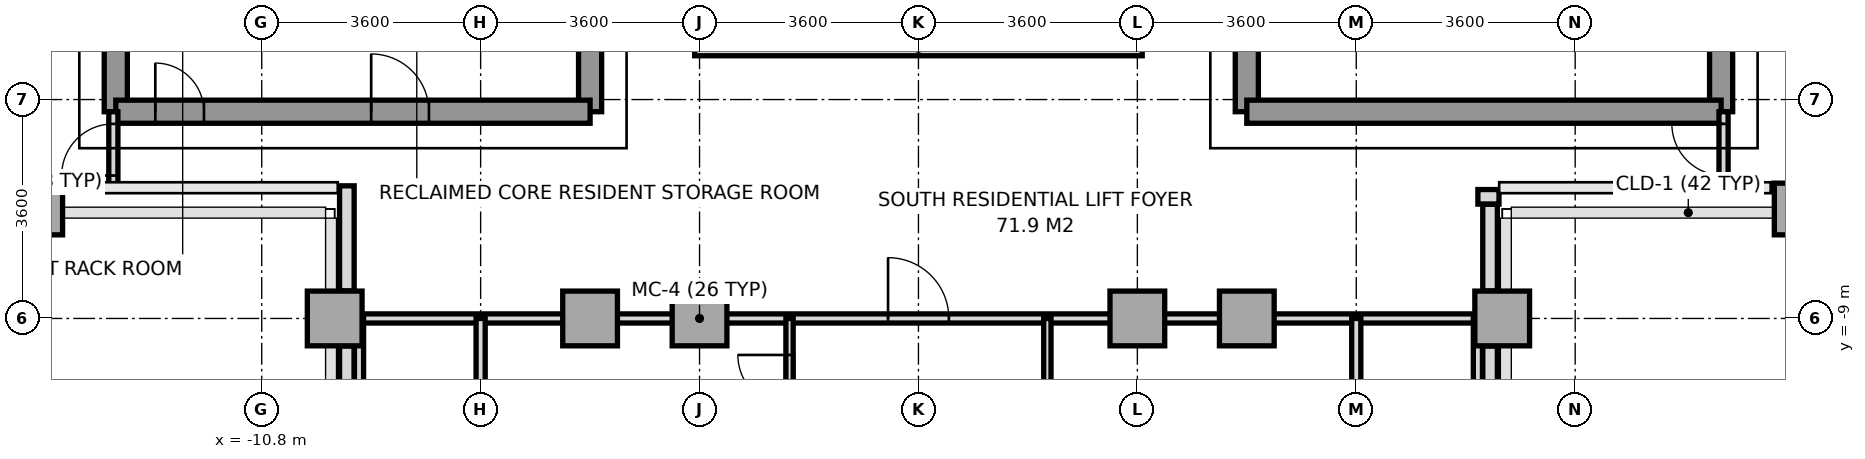
"""IFC4 building model, lengths in metres.
Left out: names, types, materials, properties, quantities, classifications, styles, units other than length and angle.
Written with IfcOpenShell. Run it as: python <this file> out.ifc"""

import sys

from ifc_helpers import new_model, si_unit, direction, frame, frame_2d, origin, origin_2d, place, context, subcontext, project, spatial, rectangle, extrude, source, transform, mapped, element, fill, save


model = new_model("IFC4")
c1 = context("Model", 3, precision=1e-05, world=origin(), true_north=direction((0.0, 1.0)))
c2 = subcontext(c1, "Body", "Model", "MODEL_VIEW")
j1 = project(units=[si_unit("LENGTHUNIT", "METRE"), si_unit("PLANEANGLEUNIT", "RADIAN")], contexts=[c1])
p1 = place(None, origin())
s1 = spatial("IfcSite", under=j1, at=p1, CompositionType="ELEMENT")
p2 = place(p1, origin())
s2 = spatial("IfcBuilding", under=s1, at=p2, CompositionType="ELEMENT")
p3 = place(p2, frame((0.0, 0.0, 208.0)))
s3 = spatial("IfcBuildingStorey", under=s2, at=p3, CompositionType="ELEMENT", Elevation=208.0)
m1 = source(origin(), c2, "Body", "SweptSolid", [
    extrude(rectangle(XDim=0.65, YDim=0.85, at=origin_2d()), origin(), (0.0, 0.0, 1.0), 3.2),
])
p4 = place(p3, frame((-14.4, -7.2, 0.0), z_axis=(0.0, 0.0, 1.0), x_axis=(1.0, 0.0, 0.0)))
e1 = element("IfcColumn", 1, at=p4, inside=s3, PredefinedType="COLUMN", context=c2, shape_type="MappedRepresentation", body=[
    mapped(m1, transform((0.0, 0.0, 0.0), x_axis=(1.0, 0.0, 0.0), y_axis=(0.0, 1.0, 0.0), z_axis=(0.0, 0.0, 1.0), scale=1.0)),
])
m2 = source(origin(), c2, "Body", "SweptSolid", [
    extrude(rectangle(XDim=0.9, YDim=0.9, at=origin_2d()), origin(), (0.0, 0.0, 1.0), 3.2),
])
for number, where, z_axis, x_axis in (
    (2, (-9.6, -9.0, 0.0), (0.0, 0.0, 1.0), (1.0, 0.0, 0.0)),
    (3, (-5.4, -9.0, 0.0), (0.0, 0.0, 1.0), (1.0, 0.0, 0.0)),
    (4, (-3.6, -9.0, 0.0), (0.0, 0.0, 1.0), (1.0, 0.0, 0.0)),
    (5, (3.6, -9.0, 0.0), (0.0, 0.0, 1.0), (1.0, 0.0, 0.0)),
    (6, (5.4, -9.0, 0.0), (0.0, 0.0, 1.0), (1.0, 0.0, 0.0)),
    (7, (9.6, -9.0, 0.0), (0.0, 0.0, 1.0), (1.0, 0.0, 0.0)),
):
    element("IfcColumn", number, at=place(p3, frame(where, z_axis=z_axis, x_axis=x_axis)), inside=s3, PredefinedType="COLUMN", context=c2, shape_type="MappedRepresentation", body=[
        mapped(m2, transform((0.0, 0.0, 0.0), x_axis=(1.0, 0.0, 0.0), y_axis=(0.0, 1.0, 0.0), z_axis=(0.0, 0.0, 1.0), scale=1.0)),
    ])
p5 = place(p3, frame((14.4, -7.2, 0.0), z_axis=(0.0, 0.0, 1.0), x_axis=(1.0, 0.0, 0.0)))
e8 = element("IfcColumn", 8, at=p5, inside=s3, PredefinedType="COLUMN", context=c2, shape_type="MappedRepresentation", body=[
    mapped(m1, transform((0.0, 0.0, 0.0), x_axis=(1.0, 0.0, 0.0), y_axis=(0.0, 1.0, 0.0), z_axis=(0.0, 0.0, 1.0), scale=1.0)),
])
p6 = place(p3, frame((9.547, -7.0, 0.0), z_axis=(0.0, 0.0, 1.0), x_axis=(-1.0, 0.0, 0.0)))
e9 = element("IfcWall", 9, at=p6, inside=s3, PredefinedType="PARAPET", context=c2, shape_type="SweptSolid", body=[
    extrude(rectangle(XDim=0.347, YDim=0.24, at=frame_2d((0.174, 0.0))), origin(), (0.0, 0.0, 1.0), 1.15),
])
p7 = place(p3, frame((9.4, -7.123, 0.0), z_axis=(0.0, 0.0, 1.0), x_axis=(0.0, -1.0, 0.0)))
e10 = element("IfcWall", 10, at=p7, inside=s3, PredefinedType="PARAPET", context=c2, shape_type="SweptSolid", body=[
    extrude(rectangle(XDim=1.424, YDim=0.24, at=frame_2d((0.712, 0.0))), origin(), (0.0, 0.0, 1.0), 1.15),
])
p8 = place(p3, frame((9.4, -9.453, 0.0), z_axis=(0.0, 0.0, 1.0), x_axis=(0.0, -1.0, 0.0)))
e11 = element("IfcWall", 11, at=p8, inside=s3, PredefinedType="PARAPET", context=c2, shape_type="SweptSolid", body=[
    extrude(rectangle(XDim=6.15, YDim=0.24, at=frame_2d((3.075, 0.0))), origin(), (0.0, 0.0, 1.0), 1.15),
])
p9 = place(p3, frame((-9.4, -15.358, 0.0), z_axis=(0.0, 0.0, 1.0), x_axis=(0.0, 1.0, 0.0)))
e12 = element("IfcWall", 12, at=p9, inside=s3, PredefinedType="PARAPET", context=c2, shape_type="SweptSolid", body=[
    extrude(rectangle(XDim=5.905, YDim=0.24, at=frame_2d((2.952, 0.0))), origin(), (0.0, 0.0, 1.0), 1.15),
])
p10 = place(p3, frame((-9.4, -8.547, 0.0), z_axis=(0.0, 0.0, 1.0), x_axis=(0.0, 1.0, 0.0)))
e13 = element("IfcWall", 13, at=p10, inside=s3, PredefinedType="PARAPET", context=c2, shape_type="SweptSolid", body=[
    extrude(rectangle(XDim=1.728, YDim=0.24, at=frame_2d((0.864, 0.0))), origin(), (0.0, 0.0, 1.0), 1.15),
])
p11 = place(p3, frame((-13.2, -5.6, 0.0), z_axis=(0.0, 0.0, 1.0), x_axis=(0.0, 1.0, 0.0)))
e14 = element("IfcWall", 14, at=p11, inside=s3, PredefinedType="SHEAR", context=c2, shape_type="SweptSolid", body=[
    extrude(rectangle(XDim=11.2, YDim=0.38, at=frame_2d((5.6, 0.0))), origin(), (0.0, 0.0, 1.0), 3.2),
])
p12 = place(p3, frame((-5.4, -5.6, 0.0), z_axis=(0.0, 0.0, 1.0), x_axis=(0.0, 1.0, 0.0)))
e15 = element("IfcWall", 15, at=p12, inside=s3, PredefinedType="SHEAR", context=c2, shape_type="SweptSolid", body=[
    extrude(rectangle(XDim=12.5, YDim=0.38, at=frame_2d((6.25, 0.0))), origin(), (0.0, 0.0, 1.0), 3.2),
])
p13 = place(p12, frame((4.55, 0.0, 0.0)))
e16 = element("IfcOpeningElement", 16, at=p13, cuts=e15, PredefinedType="OPENING", context=c2, shape_type="SweptSolid", body=[
    extrude(rectangle(XDim=1.2, YDim=2.2, at=frame_2d((0.6, 1.1))), frame((0.0, 0.2, 0.0), z_axis=(0.0, -1.0, 0.0), x_axis=(1.0, 0.0, 0.0)), (0.0, 0.0, 1.0), 0.4),
])
p14 = place(p12, frame((10.45, 0.0, 0.0)))
e17 = element("IfcOpeningElement", 17, at=p14, cuts=e15, PredefinedType="OPENING", context=c2, shape_type="SweptSolid", body=[
    extrude(rectangle(XDim=1.2, YDim=2.2, at=frame_2d((0.6, 1.1))), frame((0.0, 0.2, 0.0), z_axis=(0.0, -1.0, 0.0), x_axis=(1.0, 0.0, 0.0)), (0.0, 0.0, 1.0), 0.4),
])
p15 = place(p12, frame((6.86, 0.0, 0.0)))
e18 = element("IfcOpeningElement", 18, at=p15, cuts=e15, PredefinedType="OPENING", context=c2, shape_type="SweptSolid", body=[
    extrude(rectangle(XDim=0.8, YDim=2.1, at=frame_2d((0.4, 1.05))), frame((0.0, 0.2, 0.0), z_axis=(0.0, -1.0, 0.0), x_axis=(1.0, 0.0, 0.0)), (0.0, 0.0, 1.0), 0.4),
])
p16 = place(p3, frame((-13.2, -5.6, 0.0), z_axis=(0.0, 0.0, 1.0), x_axis=(1.0, 0.0, 0.0)))
e19 = element("IfcWall", 19, at=p16, inside=s3, PredefinedType="SHEAR", context=c2, shape_type="SweptSolid", body=[
    extrude(rectangle(XDim=7.8, YDim=0.38, at=frame_2d((3.9, 0.0))), origin(), (0.0, 0.0, 1.0), 3.2),
])
p17 = place(p16, frame((0.65, 0.0, 0.0)))
e20 = element("IfcOpeningElement", 20, at=p17, cuts=e19, PredefinedType="OPENING", context=c2, shape_type="SweptSolid", body=[
    extrude(rectangle(XDim=0.8, YDim=2.1, at=frame_2d((0.4, 1.05))), frame((0.0, 0.2, 0.0), z_axis=(0.0, -1.0, 0.0), x_axis=(1.0, 0.0, 0.0)), (0.0, 0.0, 1.0), 0.4),
])
p18 = place(p16, frame((4.2, 0.0, 0.0)))
e21 = element("IfcOpeningElement", 21, at=p18, cuts=e19, PredefinedType="OPENING", context=c2, shape_type="SweptSolid", body=[
    extrude(rectangle(XDim=0.95, YDim=2.15, at=frame_2d((0.475, 1.075))), frame((0.0, 0.2, 0.0), z_axis=(0.0, -1.0, 0.0), x_axis=(1.0, 0.0, 0.0)), (0.0, 0.0, 1.0), 0.4),
])
p19 = place(p3, frame((13.2, -5.6, 0.0), z_axis=(0.0, 0.0, 1.0), x_axis=(0.0, 1.0, 0.0)))
e22 = element("IfcWall", 22, at=p19, inside=s3, PredefinedType="SHEAR", context=c2, shape_type="SweptSolid", body=[
    extrude(rectangle(XDim=11.2, YDim=0.38, at=frame_2d((5.6, 0.0))), origin(), (0.0, 0.0, 1.0), 3.2),
])
p20 = place(p3, frame((5.4, -5.6, 0.0), z_axis=(0.0, 0.0, 1.0), x_axis=(0.0, 1.0, 0.0)))
e23 = element("IfcWall", 23, at=p20, inside=s3, PredefinedType="SHEAR", context=c2, shape_type="SweptSolid", body=[
    extrude(rectangle(XDim=12.5, YDim=0.38, at=frame_2d((6.25, 0.0))), origin(), (0.0, 0.0, 1.0), 3.2),
])
p21 = place(p20, frame((4.55, 0.0, 0.0)))
e24 = element("IfcOpeningElement", 24, at=p21, cuts=e23, PredefinedType="OPENING", context=c2, shape_type="SweptSolid", body=[
    extrude(rectangle(XDim=1.2, YDim=2.2, at=frame_2d((0.6, 1.1))), frame((0.0, 0.2, 0.0), z_axis=(0.0, -1.0, 0.0), x_axis=(1.0, 0.0, 0.0)), (0.0, 0.0, 1.0), 0.4),
])
p22 = place(p20, frame((10.45, 0.0, 0.0)))
e25 = element("IfcOpeningElement", 25, at=p22, cuts=e23, PredefinedType="OPENING", context=c2, shape_type="SweptSolid", body=[
    extrude(rectangle(XDim=1.2, YDim=2.2, at=frame_2d((0.6, 1.1))), frame((0.0, 0.2, 0.0), z_axis=(0.0, -1.0, 0.0), x_axis=(1.0, 0.0, 0.0)), (0.0, 0.0, 1.0), 0.4),
])
p23 = place(p20, frame((6.86, 0.0, 0.0)))
e26 = element("IfcOpeningElement", 26, at=p23, cuts=e23, PredefinedType="OPENING", context=c2, shape_type="SweptSolid", body=[
    extrude(rectangle(XDim=0.8, YDim=2.1, at=frame_2d((0.4, 1.05))), frame((0.0, 0.2, 0.0), z_axis=(0.0, -1.0, 0.0), x_axis=(1.0, 0.0, 0.0)), (0.0, 0.0, 1.0), 0.4),
])
p24 = place(p3, frame((5.4, -5.6, 0.0), z_axis=(0.0, 0.0, 1.0), x_axis=(1.0, 0.0, 0.0)))
e27 = element("IfcWall", 27, at=p24, inside=s3, PredefinedType="SHEAR", context=c2, shape_type="SweptSolid", body=[
    extrude(rectangle(XDim=7.8, YDim=0.38, at=frame_2d((3.9, 0.0))), origin(), (0.0, 0.0, 1.0), 3.2),
])
p25 = place(p3, frame((-9.55, -9.0, 0.0), z_axis=(0.0, 0.0, 1.0), x_axis=(1.0, 0.0, 0.0)))
e28 = element("IfcWall", 28, at=p25, inside=s3, PredefinedType="PARTITIONING", context=c2, shape_type="SweptSolid", body=[
    extrude(rectangle(XDim=19.1, YDim=0.15, at=frame_2d((9.55, 0.0))), origin(), (0.0, 0.0, 1.0), 2.75),
])
p26 = place(p25, frame((9.05, 0.0, 0.0)))
e29 = element("IfcOpeningElement", 29, at=p26, cuts=e28, PredefinedType="OPENING", context=c2, shape_type="SweptSolid", body=[
    extrude(rectangle(XDim=1.0, YDim=2.2, at=frame_2d((0.5, 1.1))), frame((0.0, 0.085, 0.0), z_axis=(0.0, -1.0, 0.0), x_axis=(1.0, 0.0, 0.0)), (0.0, 0.0, 1.0), 0.17),
])
for number, where, z_axis, x_axis in (
    (30, (-9.2, -15.68, 0.0), (0.0, 0.0, 1.0), (0.0, 1.0, 0.0)),
    (31, (9.2, -15.68, 0.0), (0.0, 0.0, 1.0), (0.0, 1.0, 0.0)),
):
    element("IfcWall", number, at=place(p3, frame(where, z_axis=z_axis, x_axis=x_axis)), inside=s3, PredefinedType="PARTITIONING", context=c2, shape_type="SweptSolid", body=[
        extrude(rectangle(XDim=6.68, YDim=0.15, at=frame_2d((3.34, 0.0))), origin(), (0.0, 0.0, 1.0), 2.75),
    ])
for number, where, z_axis, x_axis in (
    (32, (-7.2, -21.02, 0.0), (0.0, 0.0, 1.0), (0.0, 1.0, 0.0)),
    (33, (7.2, -21.02, 0.0), (0.0, 0.0, 1.0), (0.0, 1.0, 0.0)),
):
    element("IfcWall", number, at=place(p3, frame(where, z_axis=z_axis, x_axis=x_axis)), inside=s3, PredefinedType="PARTITIONING", context=c2, shape_type="SweptSolid", body=[
        extrude(rectangle(XDim=12.02, YDim=0.15, at=frame_2d((6.01, 0.0))), origin(), (0.0, 0.0, 1.0), 2.75),
    ])
p27 = place(p3, frame((-2.12, -18.0, 0.0), z_axis=(0.0, 0.0, 1.0), x_axis=(0.0, 1.0, 0.0)))
e34 = element("IfcWall", 34, at=p27, inside=s3, PredefinedType="PARTITIONING", context=c2, shape_type="SweptSolid", body=[
    extrude(rectangle(XDim=9.0, YDim=0.12, at=frame_2d((4.5, 0.0))), origin(), (0.0, 0.0, 1.0), 2.75),
])
p28 = place(p27, frame((7.55, 0.0, 0.0)))
e35 = element("IfcOpeningElement", 35, at=p28, cuts=e34, PredefinedType="OPENING", context=c2, shape_type="SweptSolid", body=[
    extrude(rectangle(XDim=0.85, YDim=2.1, at=frame_2d((0.425, 1.05))), frame((0.0, 0.07, 0.0), z_axis=(0.0, -1.0, 0.0), x_axis=(1.0, 0.0, 0.0)), (0.0, 0.0, 1.0), 0.14),
])
p29 = place(p27, frame((0.5, 0.0, 0.0)))
e36 = element("IfcOpeningElement", 36, at=p29, cuts=e34, PredefinedType="OPENING", context=c2, shape_type="SweptSolid", body=[
    extrude(rectangle(XDim=0.95, YDim=2.15, at=frame_2d((0.475, 1.075))), frame((0.0, 0.07, 0.0), z_axis=(0.0, -1.0, 0.0), x_axis=(1.0, 0.0, 0.0)), (0.0, 0.0, 1.0), 0.14),
])
p30 = place(p3, frame((2.12, -18.0, 0.0), z_axis=(0.0, 0.0, 1.0), x_axis=(0.0, 1.0, 0.0)))
e37 = element("IfcWall", 37, at=p30, inside=s3, PredefinedType="PARTITIONING", context=c2, shape_type="SweptSolid", body=[
    extrude(rectangle(XDim=9.0, YDim=0.12, at=frame_2d((4.5, 0.0))), origin(), (0.0, 0.0, 1.0), 2.75),
])
p31 = place(p30, frame((1.6, 0.0, 0.0)))
e38 = element("IfcOpeningElement", 38, at=p31, cuts=e37, PredefinedType="OPENING", context=c2, shape_type="SweptSolid", body=[
    extrude(rectangle(XDim=0.95, YDim=2.15, at=frame_2d((0.475, 1.075))), frame((0.0, 0.07, 0.0), z_axis=(0.0, -1.0, 0.0), x_axis=(1.0, 0.0, 0.0)), (0.0, 0.0, 1.0), 0.14),
])
p32 = place(p3, frame((-13.24, -6.85, 0.0), z_axis=(0.0, 0.0, 1.0), x_axis=(0.0, 1.0, 0.0)))
e39 = element("IfcWall", 39, at=p32, inside=s3, PredefinedType="PARTITIONING", context=c2, shape_type="SweptSolid", body=[
    extrude(rectangle(XDim=1.25, YDim=0.15, at=frame_2d((0.625, 0.0))), origin(), (0.0, 0.0, 1.0), 3.2),
])
p33 = place(p32, frame((0.2, 0.0, 0.0)))
e40 = element("IfcOpeningElement", 40, at=p33, cuts=e39, PredefinedType="OPENING", context=c2, shape_type="SweptSolid", body=[
    extrude(rectangle(XDim=0.85, YDim=2.1, at=frame_2d((0.425, 1.05))), frame((0.0, 0.085, 0.0), z_axis=(0.0, -1.0, 0.0), x_axis=(1.0, 0.0, 0.0)), (0.0, 0.0, 1.0), 0.17),
])
p34 = place(p3, frame((13.24, -6.85, 0.0), z_axis=(0.0, 0.0, 1.0), x_axis=(0.0, 1.0, 0.0)))
e41 = element("IfcWall", 41, at=p34, inside=s3, PredefinedType="PARTITIONING", context=c2, shape_type="SweptSolid", body=[
    extrude(rectangle(XDim=1.25, YDim=0.15, at=frame_2d((0.625, 0.0))), origin(), (0.0, 0.0, 1.0), 3.2),
])
p35 = place(p34, frame((0.2, 0.0, 0.0)))
e42 = element("IfcOpeningElement", 42, at=p35, cuts=e41, PredefinedType="OPENING", context=c2, shape_type="SweptSolid", body=[
    extrude(rectangle(XDim=0.85, YDim=2.1, at=frame_2d((0.425, 1.05))), frame((0.0, 0.085, 0.0), z_axis=(0.0, -1.0, 0.0), x_axis=(1.0, 0.0, 0.0)), (0.0, 0.0, 1.0), 0.17),
])
p36 = place(p3, frame((-3.68, -4.56, 0.0), z_axis=(0.0, 0.0, 1.0), x_axis=(1.0, 0.0, 0.0)))
e43 = element("IfcWall", 43, at=p36, inside=s3, PredefinedType="PARAPET", context=c2, shape_type="SweptSolid", body=[
    extrude(rectangle(XDim=7.36, YDim=0.24, at=frame_2d((3.68, 0.0))), origin(), (0.0, 0.0, 1.0), 1.15),
])
m3 = source(origin(), c2, "Body", "SweptSolid", [
    extrude(rectangle(XDim=0.8, YDim=2.1, at=frame_2d((0.4, 1.05))), frame((0.0, 0.025, 0.0), z_axis=(0.0, -1.0, 0.0), x_axis=(1.0, 0.0, 0.0)), (0.0, 0.0, 1.0), 0.05),
])
p37 = place(p17, origin())
e44 = element("IfcDoor", 44, at=p37, inside=s3, OperationType="SINGLE_SWING_LEFT", PredefinedType="DOOR", context=c2, shape_type="MappedRepresentation", body=[
    mapped(m3, transform((0.0, 0.0, 0.0), x_axis=(1.0, 0.0, 0.0), y_axis=(0.0, 1.0, 0.0), z_axis=(0.0, 0.0, 1.0), scale=1.0)),
])
fill(e20, e44)
m4 = source(origin(), c2, "Body", "SweptSolid", [
    extrude(rectangle(XDim=0.95, YDim=2.15, at=frame_2d((0.475, 1.075))), frame((0.0, 0.025, 0.0), z_axis=(0.0, -1.0, 0.0), x_axis=(1.0, 0.0, 0.0)), (0.0, 0.0, 1.0), 0.05),
])
p38 = place(p18, origin())
e45 = element("IfcDoor", 45, at=p38, inside=s3, OperationType="SINGLE_SWING_LEFT", PredefinedType="DOOR", context=c2, shape_type="MappedRepresentation", body=[
    mapped(m4, transform((0.0, 0.0, 0.0), x_axis=(1.0, 0.0, 0.0), y_axis=(0.0, 1.0, 0.0), z_axis=(0.0, 0.0, 1.0), scale=1.0)),
])
fill(e21, e45)
m5 = source(origin(), c2, "Body", "SweptSolid", [
    extrude(rectangle(XDim=1.0, YDim=2.2, at=frame_2d((0.5, 1.1))), frame((0.0, 0.025, 0.0), z_axis=(0.0, -1.0, 0.0), x_axis=(1.0, 0.0, 0.0)), (0.0, 0.0, 1.0), 0.05),
])
p39 = place(p26, origin())
e46 = element("IfcDoor", 46, at=p39, inside=s3, OperationType="SINGLE_SWING_LEFT", PredefinedType="DOOR", context=c2, shape_type="MappedRepresentation", body=[
    mapped(m5, transform((0.0, 0.0, 0.0), x_axis=(1.0, 0.0, 0.0), y_axis=(0.0, 1.0, 0.0), z_axis=(0.0, 0.0, 1.0), scale=1.0)),
])
fill(e29, e46)
m6 = source(origin(), c2, "Body", "SweptSolid", [
    extrude(rectangle(XDim=0.85, YDim=2.1, at=frame_2d((0.425, 1.05))), frame((0.0, 0.025, 0.0), z_axis=(0.0, -1.0, 0.0), x_axis=(1.0, 0.0, 0.0)), (0.0, 0.0, 1.0), 0.05),
])
p40 = place(p28, origin())
e47 = element("IfcDoor", 47, at=p40, inside=s3, OperationType="SINGLE_SWING_RIGHT", PredefinedType="DOOR", context=c2, shape_type="MappedRepresentation", body=[
    mapped(m6, transform((0.0, 0.0, 0.0), x_axis=(1.0, 0.0, 0.0), y_axis=(0.0, 1.0, 0.0), z_axis=(0.0, 0.0, 1.0), scale=1.0)),
])
fill(e35, e47)
p41 = place(p33, origin())
e48 = element("IfcDoor", 48, at=p41, inside=s3, OperationType="SINGLE_SWING_LEFT", PredefinedType="DOOR", context=c2, shape_type="MappedRepresentation", body=[
    mapped(m6, transform((0.0, 0.0, 0.0), x_axis=(1.0, 0.0, 0.0), y_axis=(0.0, 1.0, 0.0), z_axis=(0.0, 0.0, 1.0), scale=1.0)),
])
fill(e40, e48)
p42 = place(p35, origin())
e49 = element("IfcDoor", 49, at=p42, inside=s3, OperationType="SINGLE_SWING_RIGHT", PredefinedType="DOOR", context=c2, shape_type="MappedRepresentation", body=[
    mapped(m6, transform((0.0, 0.0, 0.0), x_axis=(1.0, 0.0, 0.0), y_axis=(0.0, 1.0, 0.0), z_axis=(0.0, 0.0, 1.0), scale=1.0)),
])
fill(e42, e49)
save(model, sys.argv[1])
